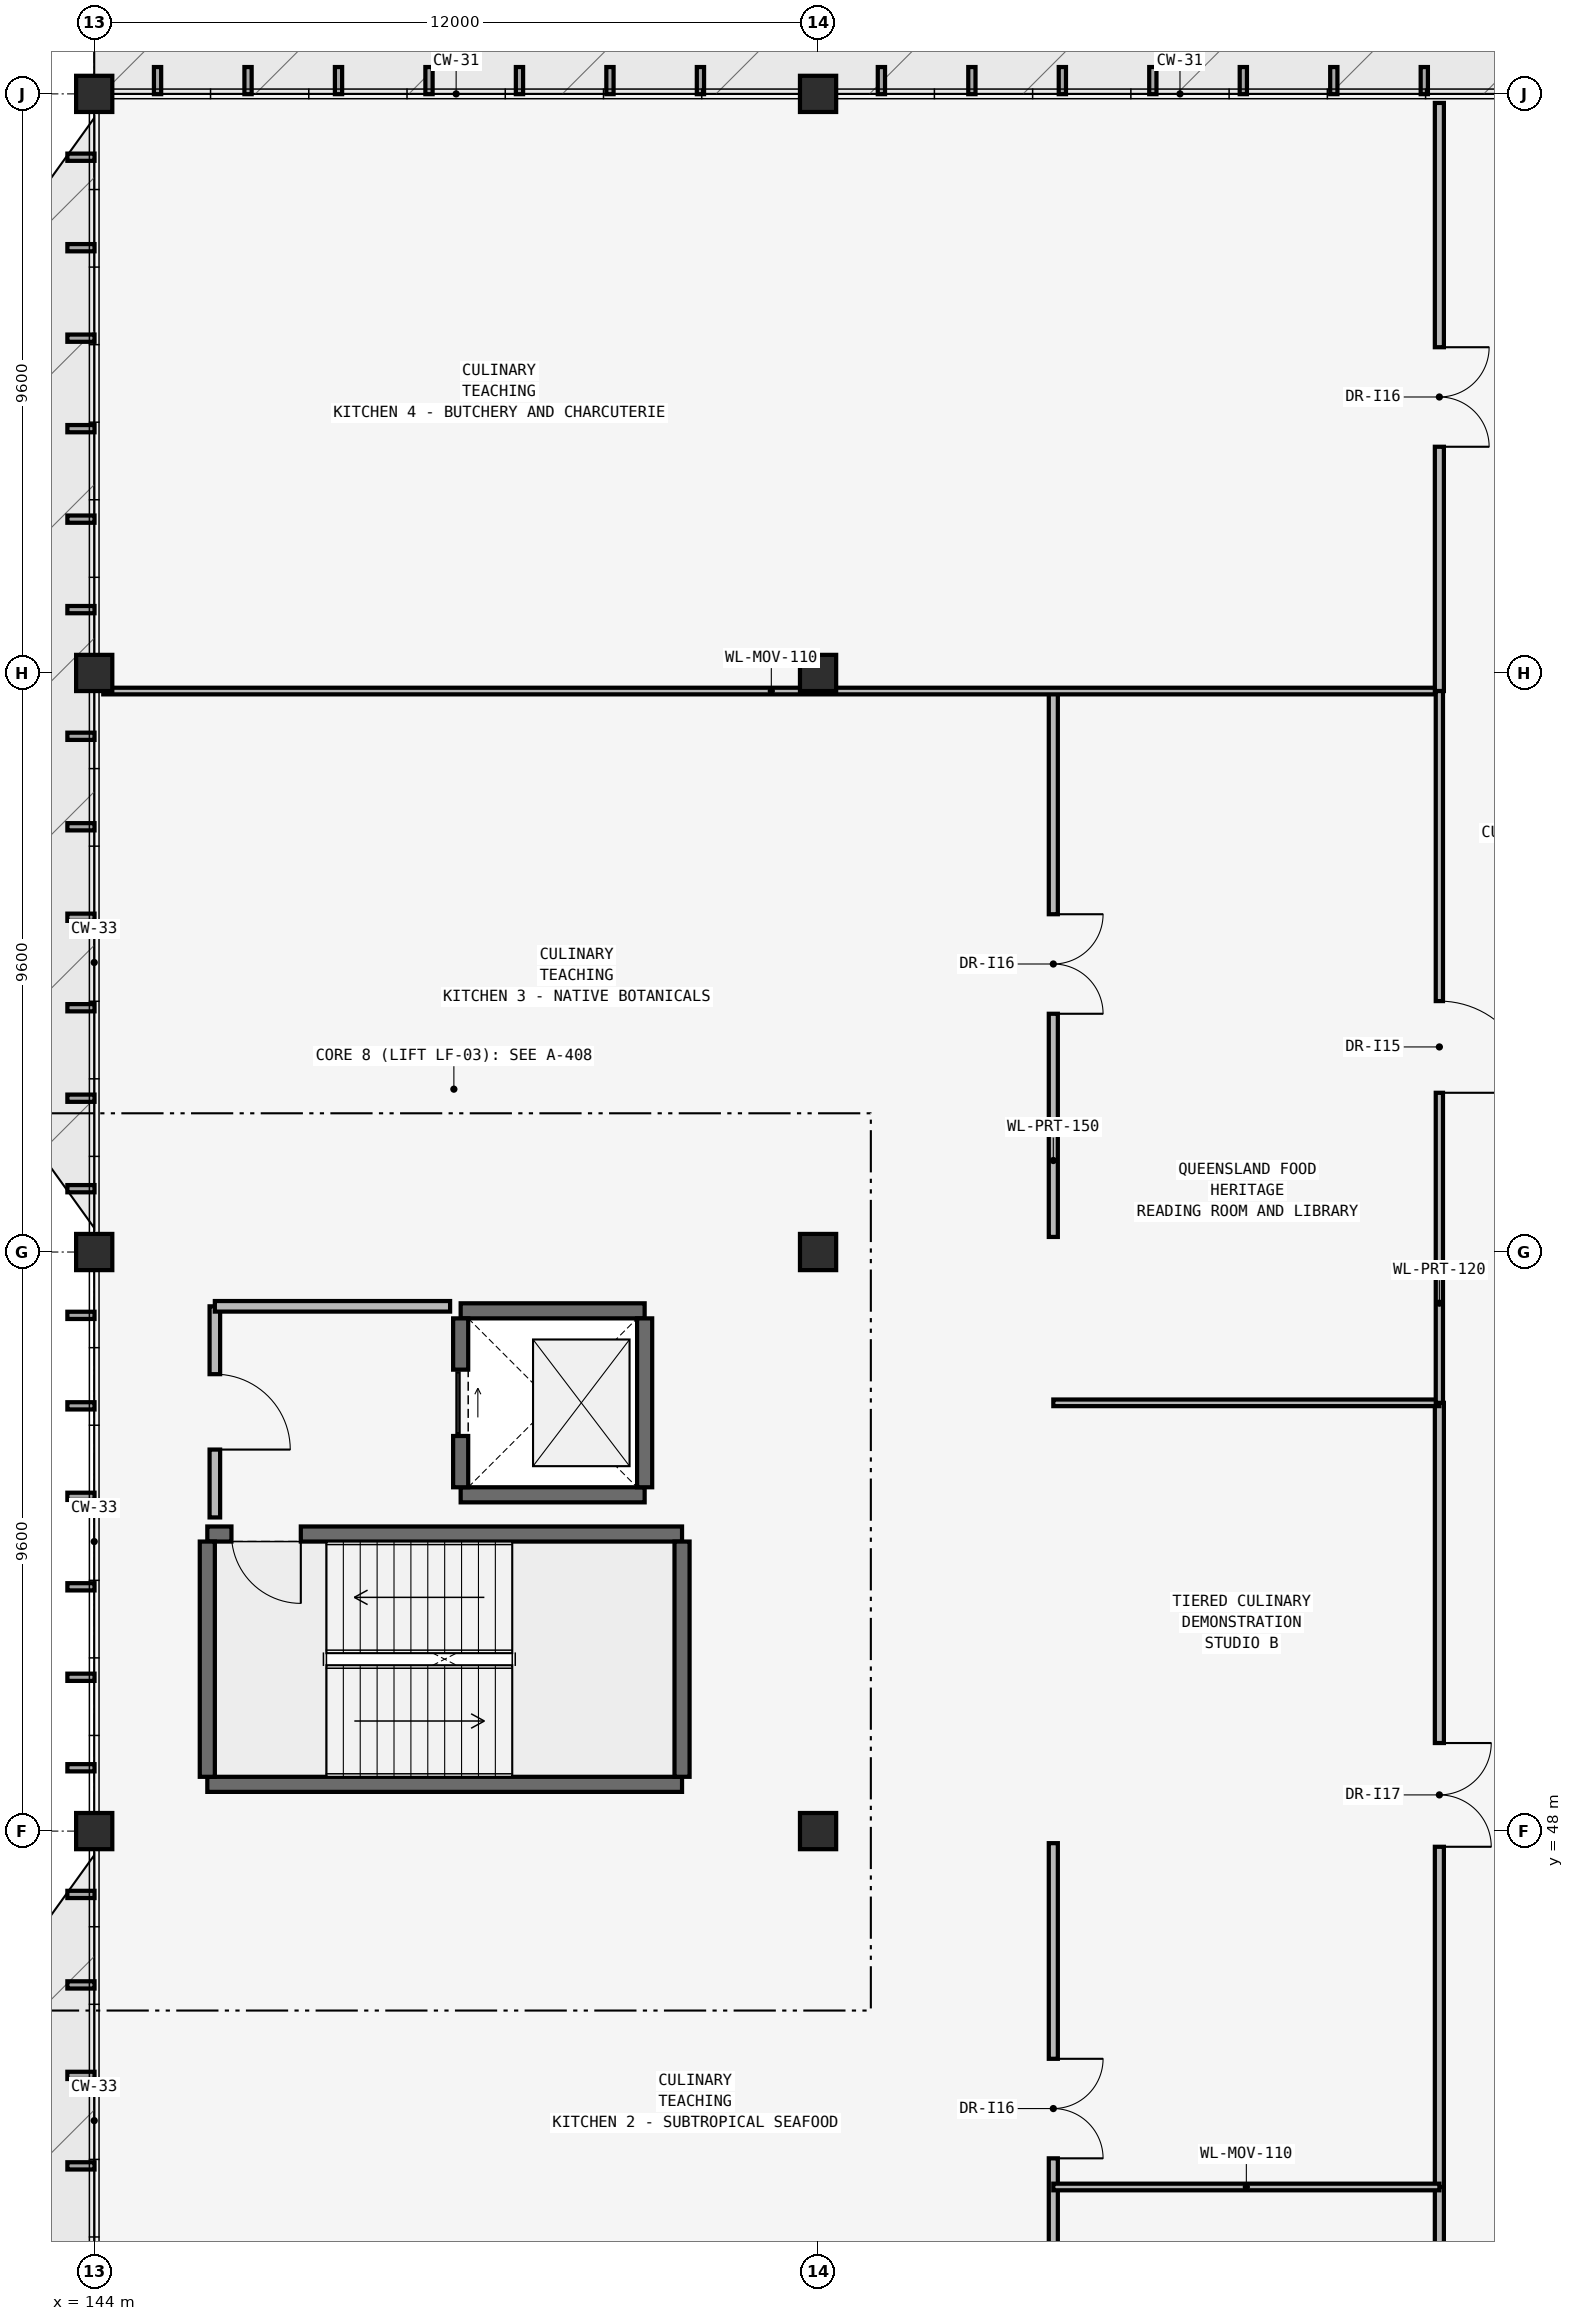
"""IFC4 building model, lengths in metres.
Left out: names, types, materials, properties, quantities, classifications, styles, units other than length and angle.
Written with IfcOpenShell. Run it as: python <this file> out.ifc"""

import sys

from ifc_helpers import new_model, si_unit, direction, frame, frame_2d, origin, origin_2d, place, context, subcontext, project, spatial, rectangle, extrude, element, fill, save


model = new_model("IFC4")
c1 = context("Model", 3, precision=1e-05, world=origin(), true_north=direction((0.0, 1.0)))
c2 = subcontext(c1, "Body", "Model", "MODEL_VIEW")
j1 = project(units=[si_unit("LENGTHUNIT", "METRE"), si_unit("PLANEANGLEUNIT", "RADIAN")], contexts=[c1])
p1 = place(None, origin())
s1 = spatial("IfcSite", under=j1, at=p1, CompositionType="ELEMENT")
p2 = place(p1, origin())
s2 = spatial("IfcBuilding", under=s1, at=p2, CompositionType="ELEMENT")
p3 = place(p2, frame((0.0, 0.0, 14.4)))
s3 = spatial("IfcBuildingStorey", under=s2, at=p3, CompositionType="ELEMENT", Elevation=14.4)
for number, where, z_axis, x_axis in (
    (1, (144.0, 48.0, 0.0), (0.0, 0.0, 1.0), (1.0, 0.0, 0.0)),
    (2, (144.0, 57.6, 0.0), (0.0, 0.0, 1.0), (1.0, 0.0, 0.0)),
    (3, (144.0, 67.2, 0.0), (0.0, 0.0, 1.0), (1.0, 0.0, 0.0)),
    (4, (144.0, 76.8, 0.0), (0.0, 0.0, 1.0), (1.0, 0.0, 0.0)),
    (5, (156.0, 48.0, 0.0), (0.0, 0.0, 1.0), (1.0, 0.0, 0.0)),
    (6, (156.0, 57.6, 0.0), (0.0, 0.0, 1.0), (1.0, 0.0, 0.0)),
    (7, (156.0, 67.2, 0.0), (0.0, 0.0, 1.0), (1.0, 0.0, 0.0)),
    (8, (156.0, 76.8, 0.0), (0.0, 0.0, 1.0), (1.0, 0.0, 0.0)),
):
    element("IfcColumn", number, at=place(p3, frame(where, z_axis=z_axis, x_axis=x_axis)), inside=s3, PredefinedType="COLUMN", context=c2, shape_type="SweptSolid", body=[
        extrude(rectangle(XDim=0.6, YDim=0.6, at=origin_2d()), origin(), (0.0, 0.0, 1.0), 4.2),
    ])
p4 = place(p3, frame((145.875, 48.775, 0.0), z_axis=(0.0, 0.0, 1.0), x_axis=(1.0, 0.0, 0.0)))
e9 = element("IfcWall", 9, at=p4, inside=s3, PredefinedType="SHEAR", context=c2, shape_type="SweptSolid", body=[
    extrude(rectangle(XDim=7.87, YDim=0.25, at=frame_2d((3.935, 0.0))), origin(), (0.0, 0.0, 1.0), 3.95),
])
p5 = place(p3, frame((145.875, 52.925, 0.0), z_axis=(0.0, 0.0, 1.0), x_axis=(1.0, 0.0, 0.0)))
e10 = element("IfcWall", 10, at=p5, inside=s3, PredefinedType="SHEAR", context=c2, shape_type="SweptSolid", body=[
    extrude(rectangle(XDim=7.87, YDim=0.25, at=frame_2d((3.935, 0.0))), origin(), (0.0, 0.0, 1.0), 3.95),
])
p6 = place(p5, frame((0.4, 0.0, 0.0)))
e11 = element("IfcOpeningElement", 11, at=p6, cuts=e10, PredefinedType="OPENING", context=c2, shape_type="SweptSolid", body=[
    extrude(rectangle(XDim=1.15, YDim=2.15, at=frame_2d((0.575, 1.075))), frame((0.0, 0.14, 0.0), z_axis=(0.0, -1.0, 0.0), x_axis=(1.0, 0.0, 0.0)), (0.0, 0.0, 1.0), 0.28),
])
for number, where, z_axis, x_axis in (
    (12, (145.875, 48.9, 0.0), (0.0, 0.0, 1.0), (0.0, 1.0, 0.0)),
    (13, (153.745, 48.9, 0.0), (0.0, 0.0, 1.0), (0.0, 1.0, 0.0)),
):
    element("IfcWall", number, at=place(p3, frame(where, z_axis=z_axis, x_axis=x_axis)), inside=s3, PredefinedType="SHEAR", context=c2, shape_type="SweptSolid", body=[
        extrude(rectangle(XDim=3.9, YDim=0.25, at=frame_2d((1.95, 0.0))), origin(), (0.0, 0.0, 1.0), 3.95),
    ])
for number, where, z_axis, x_axis in (
    (14, (150.075, 53.575, 0.0), (0.0, 0.0, 1.0), (1.0, 0.0, 0.0)),
    (15, (150.075, 56.625, 0.0), (0.0, 0.0, 1.0), (1.0, 0.0, 0.0)),
):
    element("IfcWall", number, at=place(p3, frame(where, z_axis=z_axis, x_axis=x_axis)), inside=s3, PredefinedType="SHEAR", context=c2, shape_type="SweptSolid", body=[
        extrude(rectangle(XDim=3.05, YDim=0.25, at=frame_2d((1.525, 0.0))), origin(), (0.0, 0.0, 1.0), 3.95),
    ])
p7 = place(p3, frame((153.125, 53.7, 0.0), z_axis=(0.0, 0.0, 1.0), x_axis=(0.0, 1.0, 0.0)))
e16 = element("IfcWall", 16, at=p7, inside=s3, PredefinedType="SHEAR", context=c2, shape_type="SweptSolid", body=[
    extrude(rectangle(XDim=2.8, YDim=0.25, at=frame_2d((1.4, 0.0))), origin(), (0.0, 0.0, 1.0), 3.95),
])
p8 = place(p3, frame((150.075, 53.7, 0.0), z_axis=(0.0, 0.0, 1.0), x_axis=(0.0, 1.0, 0.0)))
e17 = element("IfcWall", 17, at=p8, inside=s3, PredefinedType="SHEAR", context=c2, shape_type="SweptSolid", body=[
    extrude(rectangle(XDim=2.8, YDim=0.25, at=frame_2d((1.4, 0.0))), origin(), (0.0, 0.0, 1.0), 3.95),
])
p9 = place(p8, frame((0.85, 0.0, 0.0)))
e18 = element("IfcOpeningElement", 18, at=p9, cuts=e17, PredefinedType="OPENING", context=c2, shape_type="SweptSolid", body=[
    extrude(rectangle(XDim=1.1, YDim=2.15, at=frame_2d((0.55, 1.075))), frame((0.0, 0.14, 0.0), z_axis=(0.0, -1.0, 0.0), x_axis=(1.0, 0.0, 0.0)), (0.0, 0.0, 1.0), 0.28),
])
p10 = place(p3, frame((146.0, 53.2, 0.0), z_axis=(0.0, 0.0, 1.0), x_axis=(0.0, 1.0, 0.0)))
e19 = element("IfcWall", 19, at=p10, inside=s3, PredefinedType="PARTITIONING", context=c2, shape_type="SweptSolid", body=[
    extrude(rectangle(XDim=3.5, YDim=0.175, at=frame_2d((1.75, 0.0))), origin(), (0.0, 0.0, 1.0), 3.95),
])
p11 = place(p10, frame((1.125, 0.0, 0.0)))
e20 = element("IfcOpeningElement", 20, at=p11, cuts=e19, PredefinedType="OPENING", context=c2, shape_type="SweptSolid", body=[
    extrude(rectangle(XDim=1.25, YDim=2.2, at=frame_2d((0.625, 1.1))), frame((0.0, 0.103, 0.0), z_axis=(0.0, -1.0, 0.0), x_axis=(1.0, 0.0, 0.0)), (0.0, 0.0, 1.0), 0.205),
])
p12 = place(p3, frame((146.0, 56.7, 0.0), z_axis=(0.0, 0.0, 1.0), x_axis=(1.0, 0.0, 0.0)))
e21 = element("IfcWall", 21, at=p12, inside=s3, PredefinedType="PARTITIONING", context=c2, shape_type="SweptSolid", body=[
    extrude(rectangle(XDim=3.9, YDim=0.175, at=frame_2d((1.95, 0.0))), origin(), (0.0, 0.0, 1.0), 3.95),
])
p13 = place(p3, frame((159.9, 39.0, 0.0), z_axis=(0.0, 0.0, 1.0), x_axis=(0.0, 1.0, 0.0)))
e22 = element("IfcWall", 22, at=p13, inside=s3, PredefinedType="PARTITIONING", context=c2, shape_type="SweptSolid", body=[
    extrude(rectangle(XDim=8.8, YDim=0.15, at=frame_2d((4.4, 0.0))), origin(), (0.0, 0.0, 1.0), 3.95),
])
p14 = place(p13, frame((3.575, 0.0, 0.0)))
e23 = element("IfcOpeningElement", 23, at=p14, cuts=e22, PredefinedType="OPENING", context=c2, shape_type="SweptSolid", body=[
    extrude(rectangle(XDim=1.65, YDim=2.2, at=frame_2d((0.825, 1.1))), frame((0.0, 0.09, 0.0), z_axis=(0.0, -1.0, 0.0), x_axis=(1.0, 0.0, 0.0)), (0.0, 0.0, 1.0), 0.18),
])
p15 = place(p3, frame((159.9, 57.85, 0.0), z_axis=(0.0, 0.0, 1.0), x_axis=(0.0, 1.0, 0.0)))
e24 = element("IfcWall", 24, at=p15, inside=s3, PredefinedType="PARTITIONING", context=c2, shape_type="SweptSolid", body=[
    extrude(rectangle(XDim=9.05, YDim=0.15, at=frame_2d((4.525, 0.0))), origin(), (0.0, 0.0, 1.0), 3.95),
])
p16 = place(p15, frame((3.7, 0.0, 0.0)))
e25 = element("IfcOpeningElement", 25, at=p16, cuts=e24, PredefinedType="OPENING", context=c2, shape_type="SweptSolid", body=[
    extrude(rectangle(XDim=1.65, YDim=2.2, at=frame_2d((0.825, 1.1))), frame((0.0, 0.09, 0.0), z_axis=(0.0, -1.0, 0.0), x_axis=(1.0, 0.0, 0.0)), (0.0, 0.0, 1.0), 0.18),
])
p17 = place(p3, frame((144.15, 66.9, 0.0), z_axis=(0.0, 0.0, 1.0), x_axis=(1.0, 0.0, 0.0)))
e26 = element("IfcWall", 26, at=p17, inside=s3, PredefinedType="MOVABLE", context=c2, shape_type="SweptSolid", body=[
    extrude(rectangle(XDim=22.15, YDim=0.11, at=frame_2d((11.075, 0.0))), origin(), (0.0, 0.0, 1.0), 3.95),
])
p18 = place(p3, frame((166.3, 66.9, 0.0), z_axis=(0.0, 0.0, 1.0), x_axis=(0.0, 1.0, 0.0)))
e27 = element("IfcWall", 27, at=p18, inside=s3, PredefinedType="PARTITIONING", context=c2, shape_type="SweptSolid", body=[
    extrude(rectangle(XDim=9.75, YDim=0.15, at=frame_2d((4.875, 0.0))), origin(), (0.0, 0.0, 1.0), 3.95),
])
p19 = place(p18, frame((4.05, 0.0, 0.0)))
e28 = element("IfcOpeningElement", 28, at=p19, cuts=e27, PredefinedType="OPENING", context=c2, shape_type="SweptSolid", body=[
    extrude(rectangle(XDim=1.65, YDim=2.2, at=frame_2d((0.825, 1.1))), frame((0.0, 0.09, 0.0), z_axis=(0.0, -1.0, 0.0), x_axis=(1.0, 0.0, 0.0)), (0.0, 0.0, 1.0), 0.18),
])
p20 = place(p3, frame((166.3, 28.95, 0.0), z_axis=(0.0, 0.0, 1.0), x_axis=(0.0, 1.0, 0.0)))
e29 = element("IfcWall", 29, at=p20, inside=s3, PredefinedType="PARTITIONING", context=c2, shape_type="SweptSolid", body=[
    extrude(rectangle(XDim=13.15, YDim=0.15, at=frame_2d((6.575, 0.0))), origin(), (0.0, 0.0, 1.0), 3.95),
])
p21 = place(p20, frame((5.715, 0.0, 0.0)))
e30 = element("IfcOpeningElement", 30, at=p21, cuts=e29, PredefinedType="OPENING", context=c2, shape_type="SweptSolid", body=[
    extrude(rectangle(XDim=1.72, YDim=2.28, at=frame_2d((0.86, 1.14))), frame((0.0, 0.09, 0.0), z_axis=(0.0, -1.0, 0.0), x_axis=(1.0, 0.0, 0.0)), (0.0, 0.0, 1.0), 0.18),
])
p22 = place(p3, frame((166.3, 42.1, 0.0), z_axis=(0.0, 0.0, 1.0), x_axis=(0.0, 1.0, 0.0)))
e31 = element("IfcWall", 31, at=p22, inside=s3, PredefinedType="PARTITIONING", context=c2, shape_type="SweptSolid", body=[
    extrude(rectangle(XDim=13.0, YDim=0.15, at=frame_2d((6.5, 0.0))), origin(), (0.0, 0.0, 1.0), 3.95),
])
p23 = place(p22, frame((5.64, 0.0, 0.0)))
e32 = element("IfcOpeningElement", 32, at=p23, cuts=e31, PredefinedType="OPENING", context=c2, shape_type="SweptSolid", body=[
    extrude(rectangle(XDim=1.72, YDim=2.28, at=frame_2d((0.86, 1.14))), frame((0.0, 0.09, 0.0), z_axis=(0.0, -1.0, 0.0), x_axis=(1.0, 0.0, 0.0)), (0.0, 0.0, 1.0), 0.18),
])
for number, where, z_axis, x_axis in (
    (33, (159.9, 42.1, 0.0), (0.0, 0.0, 1.0), (1.0, 0.0, 0.0)),
    (34, (159.9, 55.1, 0.0), (0.0, 0.0, 1.0), (1.0, 0.0, 0.0)),
):
    element("IfcWall", number, at=place(p3, frame(where, z_axis=z_axis, x_axis=x_axis)), inside=s3, PredefinedType="MOVABLE", context=c2, shape_type="SweptSolid", body=[
        extrude(rectangle(XDim=6.4, YDim=0.11, at=frame_2d((3.2, 0.0))), origin(), (0.0, 0.0, 1.0), 3.95),
    ])
p24 = place(p3, frame((166.3, 55.1, 0.0), z_axis=(0.0, 0.0, 1.0), x_axis=(0.0, 1.0, 0.0)))
e35 = element("IfcWall", 35, at=p24, inside=s3, PredefinedType="PARTITIONING", context=c2, shape_type="SweptSolid", body=[
    extrude(rectangle(XDim=11.8, YDim=0.12, at=frame_2d((5.9, 0.0))), origin(), (0.0, 0.0, 1.0), 3.95),
])
p25 = place(p24, frame((5.14, 0.0, 0.0)))
e36 = element("IfcOpeningElement", 36, at=p25, cuts=e35, PredefinedType="OPENING", context=c2, shape_type="SweptSolid", body=[
    extrude(rectangle(XDim=1.52, YDim=2.28, at=frame_2d((0.76, 1.14))), frame((0.0, 0.075, 0.0), z_axis=(0.0, -1.0, 0.0), x_axis=(1.0, 0.0, 0.0)), (0.0, 0.0, 1.0), 0.15),
])
p26 = place(p6, frame((1.15, 0.0, 0.0), z_axis=(0.0, 0.0, 1.0), x_axis=(-1.0, 0.0, 0.0)))
e37 = element("IfcDoor", 37, at=p26, inside=s3, OperationType="SINGLE_SWING_RIGHT", PredefinedType="DOOR", context=c2, shape_type="SweptSolid", body=[
    extrude(rectangle(XDim=1.15, YDim=2.15, at=frame_2d((0.575, 1.075))), frame((0.0, 0.025, 0.0), z_axis=(0.0, -1.0, 0.0), x_axis=(1.0, 0.0, 0.0)), (0.0, 0.0, 1.0), 0.05),
])
fill(e11, e37)
p27 = place(p9, origin())
e38 = element("IfcDoor", 38, at=p27, inside=s3, OperationType="SLIDING_TO_LEFT", PredefinedType="DOOR", context=c2, shape_type="SweptSolid", body=[
    extrude(rectangle(XDim=1.1, YDim=2.15, at=frame_2d((0.55, 1.075))), frame((0.0, 0.025, 0.0), z_axis=(0.0, -1.0, 0.0), x_axis=(1.0, 0.0, 0.0)), (0.0, 0.0, 1.0), 0.05),
])
fill(e18, e38)
p28 = place(p11, frame((1.25, 0.0, 0.0), z_axis=(0.0, 0.0, 1.0), x_axis=(-1.0, 0.0, 0.0)))
e39 = element("IfcDoor", 39, at=p28, inside=s3, OperationType="SINGLE_SWING_LEFT", PredefinedType="DOOR", context=c2, shape_type="SweptSolid", body=[
    extrude(rectangle(XDim=1.25, YDim=2.2, at=frame_2d((0.625, 1.1))), frame((0.0, 0.025, 0.0), z_axis=(0.0, -1.0, 0.0), x_axis=(1.0, 0.0, 0.0)), (0.0, 0.0, 1.0), 0.05),
])
fill(e20, e39)
p29 = place(p14, origin())
e40 = element("IfcDoor", 40, at=p29, inside=s3, OperationType="DOUBLE_DOOR_SINGLE_SWING", PredefinedType="DOOR", context=c2, shape_type="SweptSolid", body=[
    extrude(rectangle(XDim=1.65, YDim=2.2, at=frame_2d((0.825, 1.1))), frame((0.0, 0.025, 0.0), z_axis=(0.0, -1.0, 0.0), x_axis=(1.0, 0.0, 0.0)), (0.0, 0.0, 1.0), 0.05),
])
fill(e23, e40)
p30 = place(p16, origin())
e41 = element("IfcDoor", 41, at=p30, inside=s3, OperationType="DOUBLE_DOOR_SINGLE_SWING", PredefinedType="DOOR", context=c2, shape_type="SweptSolid", body=[
    extrude(rectangle(XDim=1.65, YDim=2.2, at=frame_2d((0.825, 1.1))), frame((0.0, 0.025, 0.0), z_axis=(0.0, -1.0, 0.0), x_axis=(1.0, 0.0, 0.0)), (0.0, 0.0, 1.0), 0.05),
])
fill(e25, e41)
p31 = place(p19, origin())
e42 = element("IfcDoor", 42, at=p31, inside=s3, OperationType="DOUBLE_DOOR_SINGLE_SWING", PredefinedType="DOOR", context=c2, shape_type="SweptSolid", body=[
    extrude(rectangle(XDim=1.65, YDim=2.2, at=frame_2d((0.825, 1.1))), frame((0.0, 0.025, 0.0), z_axis=(0.0, -1.0, 0.0), x_axis=(1.0, 0.0, 0.0)), (0.0, 0.0, 1.0), 0.05),
])
fill(e28, e42)
p32 = place(p23, origin())
e43 = element("IfcDoor", 43, at=p32, inside=s3, OperationType="DOUBLE_DOOR_SINGLE_SWING", PredefinedType="DOOR", context=c2, shape_type="SweptSolid", body=[
    extrude(rectangle(XDim=1.72, YDim=2.28, at=frame_2d((0.86, 1.14))), frame((0.0, 0.025, 0.0), z_axis=(0.0, -1.0, 0.0), x_axis=(1.0, 0.0, 0.0)), (0.0, 0.0, 1.0), 0.05),
])
fill(e32, e43)
p33 = place(p25, origin())
e44 = element("IfcDoor", 44, at=p33, inside=s3, OperationType="SINGLE_SWING_LEFT", PredefinedType="DOOR", context=c2, shape_type="SweptSolid", body=[
    extrude(rectangle(XDim=1.52, YDim=2.28, at=frame_2d((0.76, 1.14))), frame((0.0, 0.025, 0.0), z_axis=(0.0, -1.0, 0.0), x_axis=(1.0, 0.0, 0.0)), (0.0, 0.0, 1.0), 0.05),
])
fill(e36, e44)
save(model, sys.argv[1])
